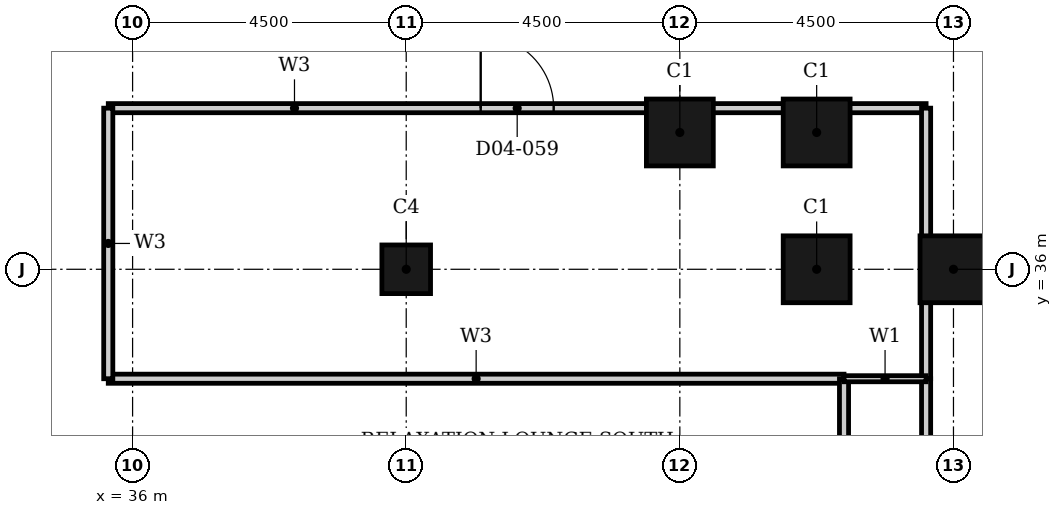
"""IFC4 building model, lengths in metres.
Left out: names, types, materials, properties, quantities, classifications, styles, units other than length and angle.
Written with IfcOpenShell. Run it as: python <this file> out.ifc"""

import sys

from ifc_helpers import new_model, si_unit, direction, frame, frame_2d, origin, origin_2d, place, context, subcontext, project, spatial, rectangle, hollow_rectangle, extrude, element, fill, save


model = new_model("IFC4")
c1 = context("Model", 3, precision=1e-05, world=origin(), true_north=direction((0.0, 1.0)))
c2 = subcontext(c1, "Body", "Model", "MODEL_VIEW")
j1 = project(units=[si_unit("LENGTHUNIT", "METRE"), si_unit("PLANEANGLEUNIT", "RADIAN")], contexts=[c1])
p1 = place(None, origin())
s1 = spatial("IfcSite", under=j1, at=p1, CompositionType="ELEMENT")
p2 = place(p1, origin())
s2 = spatial("IfcBuilding", under=s1, at=p2, CompositionType="ELEMENT")
p3 = place(p2, frame((0.0, 0.0, 24.0)))
s3 = spatial("IfcBuildingStorey", under=s2, at=p3, CompositionType="ELEMENT", Elevation=24.0)
for number, where, z_axis, x_axis in (
    (1, (49.5, 36.0, 0.0), (0.0, 0.0, 1.0), (1.0, 0.0, 0.0)),
    (2, (47.25, 36.0, 0.0), (0.0, 0.0, 1.0), (1.0, 0.0, 0.0)),
    (3, (47.25, 38.25, 0.0), (0.0, 0.0, 1.0), (1.0, 0.0, 0.0)),
    (4, (45.0, 38.25, 0.0), (0.0, 0.0, 1.0), (1.0, 0.0, 0.0)),
):
    element("IfcColumn", number, at=place(p3, frame(where, z_axis=z_axis, x_axis=x_axis)), inside=s3, PredefinedType="COLUMN", context=c2, shape_type="SweptSolid", body=[
        extrude(hollow_rectangle(XDim=1.1, YDim=1.1, WallThickness=0.036, at=origin_2d()), origin(), (0.0, 0.0, 1.0), 4.8),
    ])
p4 = place(p3, frame((40.5, 36.0, 0.0), z_axis=(0.0, 0.0, 1.0), x_axis=(1.0, 0.0, 0.0)))
e5 = element("IfcColumn", 5, at=p4, inside=s3, PredefinedType="COLUMN", context=c2, shape_type="SweptSolid", body=[
    extrude(hollow_rectangle(XDim=0.8, YDim=0.8, WallThickness=0.025, at=origin_2d()), origin(), (0.0, 0.0, 1.0), 4.8),
])
p5 = place(p3, frame((35.6, 34.2, 0.0), z_axis=(0.0, 0.0, 1.0), x_axis=(1.0, 0.0, 0.0)))
e6 = element("IfcWall", 6, at=p5, inside=s3, PredefinedType="PARTITIONING", context=c2, shape_type="SweptSolid", body=[
    extrude(rectangle(XDim=12.1, YDim=0.15, at=frame_2d((6.05, 0.0))), origin(), (0.0, 0.0, 1.0), 4.45),
])
p6 = place(p3, frame((35.6, 38.65, 0.0), z_axis=(0.0, 0.0, 1.0), x_axis=(1.0, 0.0, 0.0)))
e7 = element("IfcWall", 7, at=p6, inside=s3, PredefinedType="PARTITIONING", context=c2, shape_type="SweptSolid", body=[
    extrude(rectangle(XDim=13.45, YDim=0.15, at=frame_2d((6.725, 0.0))), origin(), (0.0, 0.0, 1.0), 4.45),
])
p7 = place(p6, frame((6.125, 0.0, 0.0)))
e8 = element("IfcOpeningElement", 8, at=p7, cuts=e7, PredefinedType="OPENING", context=c2, shape_type="SweptSolid", body=[
    extrude(rectangle(XDim=1.2, YDim=2.4, at=frame_2d((0.6, 1.2))), frame((0.0, 0.085, 0.0), z_axis=(0.0, -1.0, 0.0), x_axis=(1.0, 0.0, 0.0)), (0.0, 0.0, 1.0), 0.17),
])
p8 = place(p3, frame((35.6, 34.2, 0.0), z_axis=(0.0, 0.0, 1.0), x_axis=(0.0, 1.0, 0.0)))
e9 = element("IfcWall", 9, at=p8, inside=s3, PredefinedType="PARTITIONING", context=c2, shape_type="SweptSolid", body=[
    extrude(rectangle(XDim=4.45, YDim=0.15, at=frame_2d((2.225, 0.0))), origin(), (0.0, 0.0, 1.0), 4.45),
])
p9 = place(p3, frame((47.7, 19.9, 0.0), z_axis=(0.0, 0.0, 1.0), x_axis=(0.0, 1.0, 0.0)))
e10 = element("IfcWall", 10, at=p9, inside=s3, PredefinedType="PARTITIONING", context=c2, shape_type="SweptSolid", body=[
    extrude(rectangle(XDim=14.3, YDim=0.15, at=frame_2d((7.15, 0.0))), origin(), (0.0, 0.0, 1.0), 4.45),
])
p10 = place(p9, frame((6.7, 0.0, 0.0)))
e11 = element("IfcOpeningElement", 11, at=p10, cuts=e10, PredefinedType="OPENING", context=c2, shape_type="SweptSolid", body=[
    extrude(rectangle(XDim=0.9, YDim=2.1, at=frame_2d((0.45, 1.05))), frame((0.0, 0.085, 0.0), z_axis=(0.0, -1.0, 0.0), x_axis=(1.0, 0.0, 0.0)), (0.0, 0.0, 1.0), 0.17),
])
p11 = place(p3, frame((49.05, 34.2, 0.0), z_axis=(0.0, 0.0, 1.0), x_axis=(0.0, 1.0, 0.0)))
e12 = element("IfcWall", 12, at=p11, inside=s3, PredefinedType="PARTITIONING", context=c2, shape_type="SweptSolid", body=[
    extrude(rectangle(XDim=4.45, YDim=0.15, at=frame_2d((2.225, 0.0))), origin(), (0.0, 0.0, 1.0), 4.45),
])
p12 = place(p3, frame((49.05, 32.05, 0.0), z_axis=(0.0, 0.0, 1.0), x_axis=(0.0, 1.0, 0.0)))
e13 = element("IfcWall", 13, at=p12, inside=s3, PredefinedType="PARTITIONING", context=c2, shape_type="SweptSolid", body=[
    extrude(rectangle(XDim=2.15, YDim=0.15, at=frame_2d((1.075, 0.0))), origin(), (0.0, 0.0, 1.0), 4.45),
])
p13 = place(p3, frame((47.7, 34.2, 0.0), z_axis=(0.0, 0.0, 1.0), x_axis=(1.0, 0.0, 0.0)))
e14 = element("IfcWall", 14, at=p13, inside=s3, PredefinedType="PARTITIONING", context=c2, shape_type="SweptSolid", body=[
    extrude(rectangle(XDim=1.35, YDim=0.1, at=frame_2d((0.675, 0.0))), origin(), (0.0, 0.0, 1.0), 4.45),
])
p14 = place(p7, origin())
e15 = element("IfcDoor", 15, at=p14, inside=s3, OperationType="SINGLE_SWING_RIGHT", PredefinedType="DOOR", context=c2, shape_type="SweptSolid", body=[
    extrude(rectangle(XDim=1.2, YDim=2.4, at=frame_2d((0.6, 1.2))), frame((0.0, 0.025, 0.0), z_axis=(0.0, -1.0, 0.0), x_axis=(1.0, 0.0, 0.0)), (0.0, 0.0, 1.0), 0.05),
])
fill(e8, e15)
save(model, sys.argv[1])
